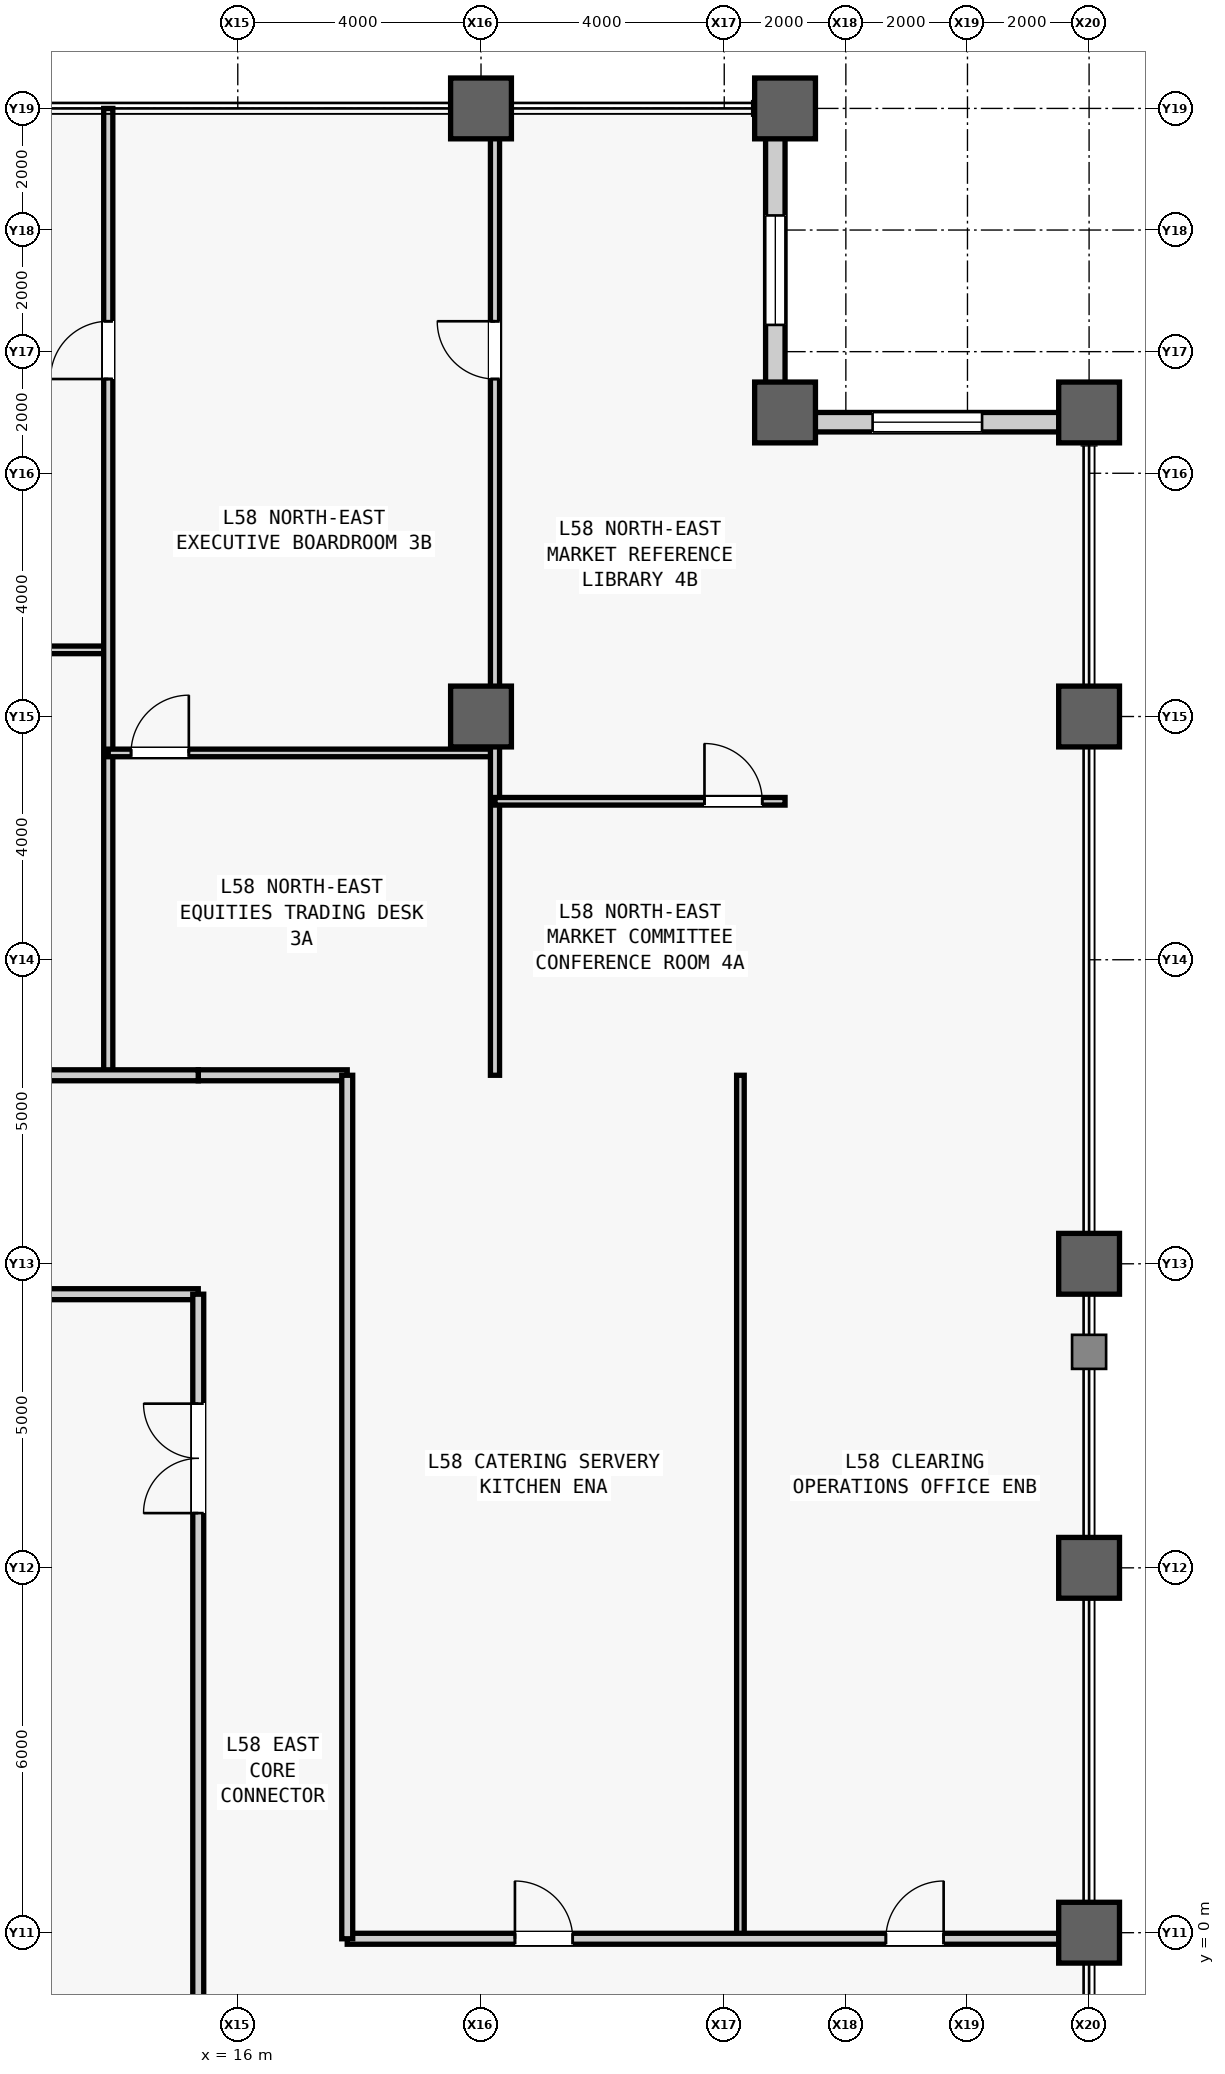
"""IFC4 building model, lengths in metres.
Left out: names, types, materials, properties, quantities, classifications, styles, units other than length and angle.
Written with IfcOpenShell. Run it as: python <this file> out.ifc"""

import sys

from ifc_helpers import new_model, si_unit, direction, frame, frame_2d, origin, origin_2d, place, context, subcontext, project, spatial, rectangle, hollow_rectangle, extrude, source, transform, mapped, element, fill, save


model = new_model("IFC4")
c1 = context("Model", 3, precision=1e-05, world=origin(), true_north=direction((0.0, 1.0)))
c2 = subcontext(c1, "Body", "Model", "MODEL_VIEW")
j1 = project(units=[si_unit("LENGTHUNIT", "METRE"), si_unit("PLANEANGLEUNIT", "RADIAN")], contexts=[c1])
p1 = place(None, origin())
s1 = spatial("IfcSite", under=j1, at=p1, CompositionType="ELEMENT")
p2 = place(p1, origin())
s2 = spatial("IfcBuilding", under=s1, at=p2, CompositionType="ELEMENT")
p3 = place(p2, frame((0.0, 0.0, 247.1)))
s3 = spatial("IfcBuildingStorey", under=s2, at=p3, CompositionType="ELEMENT", Elevation=247.1)
m1 = source(origin(), c2, "Body", "SweptSolid", [
    extrude(hollow_rectangle(XDim=1.0, YDim=1.0, WallThickness=0.055, at=origin_2d()), origin(), (0.0, 0.0, 1.0), 4.0),
])
for number, where, z_axis, x_axis in (
    (1, (20.0, 20.0, 0.0), (0.0, 0.0, 1.0), (1.0, 0.0, 0.0)),
    (2, (20.0, 30.0, 0.0), (0.0, 0.0, 1.0), (1.0, 0.0, 0.0)),
    (3, (25.0, 25.0, 0.0), (0.0, 0.0, 1.0), (1.0, 0.0, 0.0)),
    (4, (25.0, 30.0, 0.0), (0.0, 0.0, 1.0), (1.0, 0.0, 0.0)),
    (5, (30.0, 0.0, 0.0), (0.0, 0.0, 1.0), (1.0, 0.0, 0.0)),
    (6, (30.0, 6.0, 0.0), (0.0, 0.0, 1.0), (1.0, 0.0, 0.0)),
    (7, (30.0, 11.0, 0.0), (0.0, 0.0, 1.0), (1.0, 0.0, 0.0)),
    (8, (30.0, 20.0, 0.0), (0.0, 0.0, 1.0), (1.0, 0.0, 0.0)),
    (9, (30.0, 25.0, 0.0), (0.0, 0.0, 1.0), (1.0, 0.0, 0.0)),
):
    element("IfcColumn", number, at=place(p3, frame(where, z_axis=z_axis, x_axis=x_axis)), inside=s3, PredefinedType="COLUMN", context=c2, shape_type="MappedRepresentation", body=[
        mapped(m1, transform((0.0, 0.0, 0.0), scale=1.0)),
    ])
m2 = source(origin(), c2, "Body", "SweptSolid", [
    extrude(rectangle(XDim=4.68, YDim=0.32, at=frame_2d((2.34, 0.0))), origin(), (0.0, 0.0, 1.0), 3.164),
])
p4 = place(p3, frame((25.0, 24.84, 0.0), z_axis=(0.0, 0.0, 1.0), x_axis=(1.0, 0.0, 0.0)))
e10 = element("IfcWall", 10, at=p4, inside=s3, PredefinedType="STANDARD", context=c2, shape_type="MappedRepresentation", body=[
    mapped(m2, transform((0.0, 0.0, 0.0), scale=1.0)),
])
m3 = source(origin(), c2, "Body", "SweptSolid", [
    extrude(rectangle(XDim=1.8, YDim=2.4, at=frame_2d((0.9, 1.2))), frame((0.0, 0.17, 0.0), z_axis=(0.0, -1.0, 0.0), x_axis=(1.0, 0.0, 0.0)), (0.0, 0.0, 1.0), 0.34),
])
p5 = place(p4, frame((1.44, 0.0, 0.5)))
e11 = element("IfcOpeningElement", 11, at=p5, cuts=e10, PredefinedType="OPENING", context=c2, shape_type="MappedRepresentation", body=[
    mapped(m3, transform((0.0, 0.0, 0.0), scale=1.0)),
])
p6 = place(p3, frame((24.84, 25.0, 0.0), z_axis=(0.0, 0.0, 1.0), x_axis=(0.0, 1.0, 0.0)))
e12 = element("IfcWall", 12, at=p6, inside=s3, PredefinedType="STANDARD", context=c2, shape_type="MappedRepresentation", body=[
    mapped(m2, transform((0.0, 0.0, 0.0), scale=1.0)),
])
p7 = place(p6, frame((1.44, 0.0, 0.5)))
e13 = element("IfcOpeningElement", 13, at=p7, cuts=e12, PredefinedType="OPENING", context=c2, shape_type="MappedRepresentation", body=[
    mapped(m3, transform((0.0, 0.0, 0.0), scale=1.0)),
])
m4 = source(origin(), c2, "Body", "SweptSolid", [
    extrude(rectangle(XDim=4.05, YDim=0.18, at=frame_2d((2.025, 0.0))), origin(), (0.0, 0.0, 1.0), 3.78),
])
p8 = place(p3, frame((11.3, 10.5, 0.0), z_axis=(0.0, 0.0, 1.0), x_axis=(1.0, 0.0, 0.0)))
e14 = element("IfcWall", 14, at=p8, inside=s3, PredefinedType="PARTITIONING", context=c2, shape_type="MappedRepresentation", body=[
    mapped(m4, transform((0.0, 0.0, 0.0), scale=1.0)),
])
m5 = source(origin(), c2, "Body", "SweptSolid", [
    extrude(rectangle(XDim=16.6, YDim=0.18, at=frame_2d((8.3, 0.0))), origin(), (0.0, 0.0, 1.0), 3.78),
])
p9 = place(p3, frame((15.35, -6.1, 0.0), z_axis=(0.0, 0.0, 1.0), x_axis=(0.0, 1.0, 0.0)))
e15 = element("IfcWall", 15, at=p9, inside=s3, PredefinedType="PARTITIONING", context=c2, shape_type="MappedRepresentation", body=[
    mapped(m5, transform((0.0, 0.0, 0.0), scale=1.0)),
])
m6 = source(origin(), c2, "Body", "SweptSolid", [
    extrude(rectangle(XDim=1.8, YDim=2.25, at=frame_2d((0.9, 1.125))), frame((0.0, 0.1, 0.0), z_axis=(0.0, -1.0, 0.0), x_axis=(1.0, 0.0, 0.0)), (0.0, 0.0, 1.0), 0.2),
])
p10 = place(p9, frame((2.7, 0.0, 0.0)))
e16 = element("IfcOpeningElement", 16, at=p10, cuts=e15, PredefinedType="OPENING", context=c2, shape_type="MappedRepresentation", body=[
    mapped(m6, transform((0.0, 0.0, 0.0), scale=1.0)),
])
p11 = place(p9, frame((13.0, 0.0, 0.0)))
e17 = element("IfcOpeningElement", 17, at=p11, cuts=e15, PredefinedType="OPENING", context=c2, shape_type="MappedRepresentation", body=[
    mapped(m6, transform((0.0, 0.0, 0.0), scale=1.0)),
])
m7 = source(origin(), c2, "Body", "SweptSolid", [
    extrude(rectangle(XDim=2.45, YDim=0.18, at=frame_2d((1.225, 0.0))), origin(), (0.0, 0.0, 1.0), 3.78),
])
p12 = place(p3, frame((15.35, 14.1, 0.0), z_axis=(0.0, 0.0, 1.0), x_axis=(1.0, 0.0, 0.0)))
e18 = element("IfcWall", 18, at=p12, inside=s3, PredefinedType="PARTITIONING", context=c2, shape_type="MappedRepresentation", body=[
    mapped(m7, transform((0.0, 0.0, 0.0), scale=1.0)),
])
m8 = source(origin(), c2, "Body", "SweptSolid", [
    extrude(rectangle(XDim=8.48, YDim=0.125, at=frame_2d((4.24, 0.0))), origin(), (0.0, 0.0, 1.0), 3.78),
])
p13 = place(p3, frame((5.39, 21.096, 0.0), z_axis=(0.0, 0.0, 1.0), x_axis=(1.0, 0.0, 0.0)))
e19 = element("IfcWall", 19, at=p13, inside=s3, PredefinedType="PARTITIONING", context=c2, shape_type="MappedRepresentation", body=[
    mapped(m8, transform((0.0, 0.0, 0.0), scale=1.0)),
])
m9 = source(origin(), c2, "Body", "SweptSolid", [
    extrude(rectangle(XDim=0.95, YDim=2.15, at=frame_2d((0.475, 1.075))), frame((0.0, 0.073, 0.0), z_axis=(0.0, -1.0, 0.0), x_axis=(1.0, 0.0, 0.0)), (0.0, 0.0, 1.0), 0.145),
])
p14 = place(p13, frame((0.375, 0.0, 0.0)))
e20 = element("IfcOpeningElement", 20, at=p14, cuts=e19, PredefinedType="OPENING", context=c2, shape_type="MappedRepresentation", body=[
    mapped(m9, transform((0.0, 0.0, 0.0), scale=1.0)),
])
m10 = source(origin(), c2, "Body", "SweptSolid", [
    extrude(rectangle(XDim=15.9, YDim=0.15, at=frame_2d((7.95, 0.0))), origin(), (0.0, 0.0, 1.0), 3.78),
])
p15 = place(p3, frame((13.87, 14.1, 0.0), z_axis=(0.0, 0.0, 1.0), x_axis=(0.0, 1.0, 0.0)))
e21 = element("IfcWall", 21, at=p15, inside=s3, PredefinedType="PARTITIONING", context=c2, shape_type="MappedRepresentation", body=[
    mapped(m10, transform((0.0, 0.0, 0.0), scale=1.0)),
])
m11 = source(origin(), c2, "Body", "SweptSolid", [
    extrude(rectangle(XDim=0.95, YDim=2.15, at=frame_2d((0.475, 1.075))), frame((0.0, 0.085, 0.0), z_axis=(0.0, -1.0, 0.0), x_axis=(1.0, 0.0, 0.0)), (0.0, 0.0, 1.0), 0.17),
])
p16 = place(p15, frame((11.45, 0.0, 0.0)))
e22 = element("IfcOpeningElement", 22, at=p16, cuts=e21, PredefinedType="OPENING", context=c2, shape_type="MappedRepresentation", body=[
    mapped(m11, transform((0.0, 0.0, 0.0), scale=1.0)),
])
m12 = source(origin(), c2, "Body", "SweptSolid", [
    extrude(rectangle(XDim=6.36, YDim=0.125, at=frame_2d((3.18, 0.0))), origin(), (0.0, 0.0, 1.0), 3.363),
])
p17 = place(p3, frame((13.87, 19.401, 0.0), z_axis=(0.0, 0.0, 1.0), x_axis=(1.0, 0.0, 0.0)))
e23 = element("IfcWall", 23, at=p17, inside=s3, PredefinedType="PARTITIONING", context=c2, shape_type="MappedRepresentation", body=[
    mapped(m12, transform((0.0, 0.0, 0.0), scale=1.0)),
])
p18 = place(p17, frame((0.375, 0.0, 0.0)))
e24 = element("IfcOpeningElement", 24, at=p18, cuts=e23, PredefinedType="OPENING", context=c2, shape_type="MappedRepresentation", body=[
    mapped(m9, transform((0.0, 0.0, 0.0), scale=1.0)),
])
m13 = source(origin(), c2, "Body", "SweptSolid", [
    extrude(rectangle(XDim=15.9, YDim=0.15, at=frame_2d((7.95, 0.0))), origin(), (0.0, 0.0, 1.0), 3.164),
])
p19 = place(p3, frame((20.23, 14.1, 0.0), z_axis=(0.0, 0.0, 1.0), x_axis=(0.0, 1.0, 0.0)))
e25 = element("IfcWall", 25, at=p19, inside=s3, PredefinedType="PARTITIONING", context=c2, shape_type="MappedRepresentation", body=[
    mapped(m13, transform((0.0, 0.0, 0.0), scale=1.0)),
])
p20 = place(p19, frame((11.45, 0.0, 0.0)))
e26 = element("IfcOpeningElement", 26, at=p20, cuts=e25, PredefinedType="OPENING", context=c2, shape_type="MappedRepresentation", body=[
    mapped(m11, transform((0.0, 0.0, 0.0), scale=1.0)),
])
m14 = source(origin(), c2, "Body", "SweptSolid", [
    extrude(rectangle(XDim=4.77, YDim=0.125, at=frame_2d((2.385, 0.0))), origin(), (0.0, 0.0, 1.0), 3.78),
])
p21 = place(p3, frame((20.23, 18.606, 0.0), z_axis=(0.0, 0.0, 1.0), x_axis=(1.0, 0.0, 0.0)))
e27 = element("IfcWall", 27, at=p21, inside=s3, PredefinedType="PARTITIONING", context=c2, shape_type="MappedRepresentation", body=[
    mapped(m14, transform((0.0, 0.0, 0.0), scale=1.0)),
])
p22 = place(p21, frame((3.445, 0.0, 0.0)))
e28 = element("IfcOpeningElement", 28, at=p22, cuts=e27, PredefinedType="OPENING", context=c2, shape_type="MappedRepresentation", body=[
    mapped(m9, transform((0.0, 0.0, 0.0), scale=1.0)),
])
m15 = source(origin(), c2, "Body", "SweptSolid", [
    extrude(rectangle(XDim=16.85, YDim=0.18, at=frame_2d((8.425, 0.0))), origin(), (0.0, 0.0, 1.0), 3.78),
])
p23 = place(p3, frame((-1.5, 14.1, 0.0), z_axis=(0.0, 0.0, 1.0), x_axis=(1.0, 0.0, 0.0)))
e29 = element("IfcWall", 29, at=p23, inside=s3, PredefinedType="PARTITIONING", context=c2, shape_type="MappedRepresentation", body=[
    mapped(m15, transform((0.0, 0.0, 0.0), scale=1.0)),
])
m16 = source(origin(), c2, "Body", "SweptSolid", [
    extrude(rectangle(XDim=14.2, YDim=0.125, at=frame_2d((7.1, 0.0))), origin(), (0.0, 0.0, 1.0), 3.78),
])
p24 = place(p3, frame((24.266, -0.1, 0.0), z_axis=(0.0, 0.0, 1.0), x_axis=(0.0, 1.0, 0.0)))
e30 = element("IfcWall", 30, at=p24, inside=s3, PredefinedType="PARTITIONING", context=c2, shape_type="MappedRepresentation", body=[
    mapped(m16, transform((0.0, 0.0, 0.0), scale=1.0)),
])
m17 = source(origin(), c2, "Body", "SweptSolid", [
    extrude(rectangle(XDim=12.2, YDim=0.18, at=frame_2d((6.1, 0.0))), origin(), (0.0, 0.0, 1.0), 3.085),
])
p25 = place(p3, frame((17.8, -0.1, 0.0), z_axis=(0.0, 0.0, 1.0), x_axis=(1.0, 0.0, 0.0)))
e31 = element("IfcWall", 31, at=p25, inside=s3, PredefinedType="PARTITIONING", context=c2, shape_type="MappedRepresentation", body=[
    mapped(m17, transform((0.0, 0.0, 0.0), scale=1.0)),
])
m18 = source(origin(), c2, "Body", "SweptSolid", [
    extrude(rectangle(XDim=0.95, YDim=2.15, at=frame_2d((0.475, 1.075))), frame((0.0, 0.1, 0.0), z_axis=(0.0, -1.0, 0.0), x_axis=(1.0, 0.0, 0.0)), (0.0, 0.0, 1.0), 0.2),
])
p26 = place(p25, frame((2.758, 0.0, 0.0)))
e32 = element("IfcOpeningElement", 32, at=p26, cuts=e31, PredefinedType="OPENING", context=c2, shape_type="MappedRepresentation", body=[
    mapped(m18, transform((0.0, 0.0, 0.0), scale=1.0)),
])
p27 = place(p25, frame((8.858, 0.0, 0.0)))
e33 = element("IfcOpeningElement", 33, at=p27, cuts=e31, PredefinedType="OPENING", context=c2, shape_type="MappedRepresentation", body=[
    mapped(m18, transform((0.0, 0.0, 0.0), scale=1.0)),
])
m19 = source(origin(), c2, "Body", "SweptSolid", [
    extrude(rectangle(XDim=14.2, YDim=0.18, at=frame_2d((7.1, 0.0))), origin(), (0.0, 0.0, 1.0), 3.78),
])
p28 = place(p3, frame((17.8, -0.1, 0.0), z_axis=(0.0, 0.0, 1.0), x_axis=(0.0, 1.0, 0.0)))
e34 = element("IfcWall", 34, at=p28, inside=s3, PredefinedType="PARTITIONING", context=c2, shape_type="MappedRepresentation", body=[
    mapped(m19, transform((0.0, 0.0, 0.0), scale=1.0)),
])
m20 = source(origin(), c2, "Body", "SweptSolid", [
    extrude(rectangle(XDim=1.8, YDim=2.4, at=frame_2d((0.9, 1.2))), frame((0.0, 0.03, 0.0), z_axis=(0.0, -1.0, 0.0), x_axis=(1.0, 0.0, 0.0)), (0.0, 0.0, 1.0), 0.06),
])
p29 = place(p5, origin())
e35 = element("IfcWindow", 35, at=p29, inside=s3, PartitioningType="SINGLE_PANEL", PredefinedType="WINDOW", context=c2, shape_type="MappedRepresentation", body=[
    mapped(m20, transform((0.0, 0.0, 0.0), scale=1.0)),
])
fill(e11, e35)
p30 = place(p7, origin())
e36 = element("IfcWindow", 36, at=p30, inside=s3, PartitioningType="SINGLE_PANEL", PredefinedType="WINDOW", context=c2, shape_type="MappedRepresentation", body=[
    mapped(m20, transform((0.0, 0.0, 0.0), scale=1.0)),
])
fill(e13, e36)
m21 = source(origin(), c2, "Body", "SweptSolid", [
    extrude(rectangle(XDim=1.8, YDim=2.25, at=frame_2d((0.9, 1.125))), frame((0.0, 0.025, 0.0), z_axis=(0.0, -1.0, 0.0), x_axis=(1.0, 0.0, 0.0)), (0.0, 0.0, 1.0), 0.05),
])
p31 = place(p11, origin())
e37 = element("IfcDoor", 37, at=p31, inside=s3, OperationType="SINGLE_SWING_LEFT", PredefinedType="DOOR", context=c2, shape_type="MappedRepresentation", body=[
    mapped(m21, transform((0.0, 0.0, 0.0), scale=1.0)),
])
fill(e17, e37)
m22 = source(origin(), c2, "Body", "SweptSolid", [
    extrude(rectangle(XDim=0.95, YDim=2.15, at=frame_2d((0.475, 1.075))), frame((0.0, 0.025, 0.0), z_axis=(0.0, -1.0, 0.0), x_axis=(1.0, 0.0, 0.0)), (0.0, 0.0, 1.0), 0.05),
])
p32 = place(p16, origin())
e38 = element("IfcDoor", 38, at=p32, inside=s3, OperationType="SINGLE_SWING_LEFT", PredefinedType="DOOR", context=c2, shape_type="MappedRepresentation", body=[
    mapped(m22, transform((0.0, 0.0, 0.0), scale=1.0)),
])
fill(e22, e38)
p33 = place(p18, origin())
e39 = element("IfcDoor", 39, at=p33, inside=s3, OperationType="SINGLE_SWING_RIGHT", PredefinedType="DOOR", context=c2, shape_type="MappedRepresentation", body=[
    mapped(m22, transform((0.0, 0.0, 0.0), scale=1.0)),
])
fill(e24, e39)
p34 = place(p20, origin())
e40 = element("IfcDoor", 40, at=p34, inside=s3, OperationType="SINGLE_SWING_RIGHT", PredefinedType="DOOR", context=c2, shape_type="MappedRepresentation", body=[
    mapped(m22, transform((0.0, 0.0, 0.0), scale=1.0)),
])
fill(e26, e40)
p35 = place(p22, origin())
e41 = element("IfcDoor", 41, at=p35, inside=s3, OperationType="SINGLE_SWING_LEFT", PredefinedType="DOOR", context=c2, shape_type="MappedRepresentation", body=[
    mapped(m22, transform((0.0, 0.0, 0.0), scale=1.0)),
])
fill(e28, e41)
p36 = place(p26, origin())
e42 = element("IfcDoor", 42, at=p36, inside=s3, OperationType="SINGLE_SWING_LEFT", PredefinedType="DOOR", context=c2, shape_type="MappedRepresentation", body=[
    mapped(m22, transform((0.0, 0.0, 0.0), scale=1.0)),
])
fill(e32, e42)
p37 = place(p27, origin())
e43 = element("IfcDoor", 43, at=p37, inside=s3, OperationType="SINGLE_SWING_RIGHT", PredefinedType="DOOR", context=c2, shape_type="MappedRepresentation", body=[
    mapped(m22, transform((0.0, 0.0, 0.0), scale=1.0)),
])
fill(e33, e43)
save(model, sys.argv[1])
